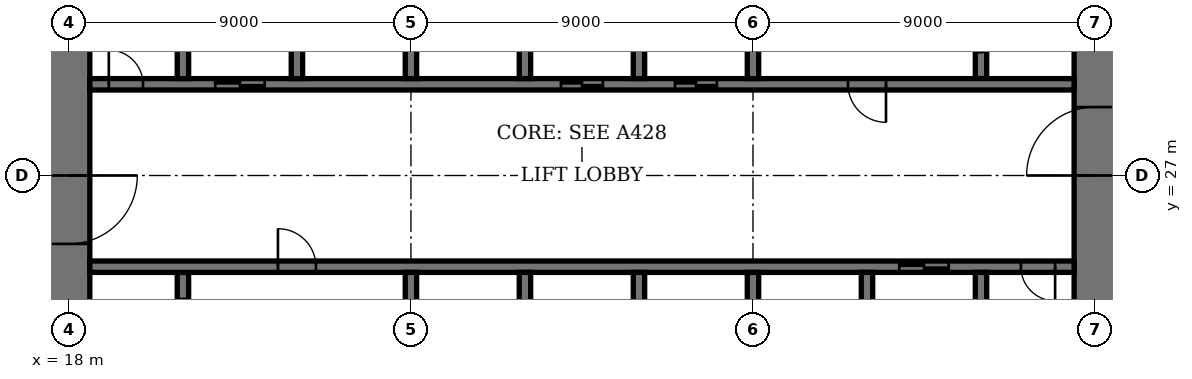
"""IFC4 building model, lengths in metres.
Left out: names, types, materials, properties, quantities, classifications, styles, units other than length and angle.
Written with IfcOpenShell. Run it as: python <this file> out.ifc"""

import sys

from ifc_helpers import new_model, si_unit, direction, frame, frame_2d, origin, place, context, subcontext, project, spatial, rectangle, extrude, element, fill, save


model = new_model("IFC4")
c1 = context("Model", 3, precision=1e-05, world=origin(), true_north=direction((0.0, 1.0)))
c2 = subcontext(c1, "Body", "Model", "MODEL_VIEW")
j1 = project(units=[si_unit("LENGTHUNIT", "METRE"), si_unit("PLANEANGLEUNIT", "RADIAN")], contexts=[c1])
p1 = place(None, origin())
s1 = spatial("IfcSite", under=j1, at=p1, CompositionType="ELEMENT")
p2 = place(p1, origin())
s2 = spatial("IfcBuilding", under=s1, at=p2, CompositionType="ELEMENT")
p3 = place(p2, frame((0.0, 0.0, 145.0)))
s3 = spatial("IfcBuildingStorey", under=s2, at=p3, CompositionType="ELEMENT", Elevation=145.0)
p4 = place(p3, frame((18.0, 35.45, 0.0), z_axis=(0.0, 0.0, 1.0), x_axis=(0.0, -1.0, 0.0)))
e1 = element("IfcWall", 1, at=p4, inside=s3, PredefinedType="SHEAR", context=c2, shape_type="SweptSolid", body=[
    extrude(rectangle(XDim=16.9, YDim=1.1, at=frame_2d((8.45, 0.0))), origin(), (0.0, 0.0, 1.0), 4.0),
])
p5 = place(p4, frame((8.45, 0.0, 0.0)))
e2 = element("IfcOpeningElement", 2, at=p5, cuts=e1, PredefinedType="OPENING", context=c2, shape_type="SweptSolid", body=[
    extrude(rectangle(XDim=1.8, YDim=2.4, at=frame_2d((0.9, 1.2))), frame((0.0, 0.56, 0.0), z_axis=(0.0, -1.0, 0.0), x_axis=(1.0, 0.0, 0.0)), (0.0, 0.0, 1.0), 1.12),
])
p6 = place(p3, frame((45.0, 18.55, 0.0), z_axis=(0.0, 0.0, 1.0), x_axis=(0.0, 1.0, 0.0)))
e3 = element("IfcWall", 3, at=p6, inside=s3, PredefinedType="SHEAR", context=c2, shape_type="SweptSolid", body=[
    extrude(rectangle(XDim=16.9, YDim=1.1, at=frame_2d((8.45, 0.0))), origin(), (0.0, 0.0, 1.0), 4.0),
])
p7 = place(p6, frame((8.45, 0.0, 0.0)))
e4 = element("IfcOpeningElement", 4, at=p7, cuts=e3, PredefinedType="OPENING", context=c2, shape_type="SweptSolid", body=[
    extrude(rectangle(XDim=1.8, YDim=2.4, at=frame_2d((0.9, 1.2))), frame((0.0, 0.56, 0.0), z_axis=(0.0, -1.0, 0.0), x_axis=(1.0, 0.0, 0.0)), (0.0, 0.0, 1.0), 1.12),
])
p8 = place(p3, frame((21.0, 21.95, 0.0), z_axis=(0.0, 0.0, 1.0), x_axis=(0.0, 1.0, 0.0)))
e5 = element("IfcWall", 5, at=p8, inside=s3, PredefinedType="SHEAR", context=c2, shape_type="SweptSolid", body=[
    extrude(rectangle(XDim=2.5, YDim=0.3, at=frame_2d((1.25, 0.0))), origin(), (0.0, 0.0, 1.0), 4.0),
])
p9 = place(p8, frame((0.7, 0.0, 0.0)))
e6 = element("IfcOpeningElement", 6, at=p9, cuts=e5, PredefinedType="OPENING", context=c2, shape_type="SweptSolid", body=[
    extrude(rectangle(XDim=1.1, YDim=2.4, at=frame_2d((0.55, 1.2))), frame((0.0, 0.16, 0.0), z_axis=(0.0, -1.0, 0.0), x_axis=(1.0, 0.0, 0.0)), (0.0, 0.0, 1.0), 0.32),
])
p10 = place(p3, frame((42.0, 29.55, 0.0), z_axis=(0.0, 0.0, 1.0), x_axis=(0.0, 1.0, 0.0)))
e7 = element("IfcWall", 7, at=p10, inside=s3, PredefinedType="SHEAR", context=c2, shape_type="SweptSolid", body=[
    extrude(rectangle(XDim=2.5, YDim=0.3, at=frame_2d((1.25, 0.0))), origin(), (0.0, 0.0, 1.0), 4.0),
])
p11 = place(p10, frame((0.7, 0.0, 0.0)))
e8 = element("IfcOpeningElement", 8, at=p11, cuts=e7, PredefinedType="OPENING", context=c2, shape_type="SweptSolid", body=[
    extrude(rectangle(XDim=1.1, YDim=2.4, at=frame_2d((0.55, 1.2))), frame((0.0, 0.16, 0.0), z_axis=(0.0, -1.0, 0.0), x_axis=(1.0, 0.0, 0.0)), (0.0, 0.0, 1.0), 0.32),
])
p12 = place(p3, frame((18.55, 24.6, 0.0), z_axis=(0.0, 0.0, 1.0), x_axis=(1.0, 0.0, 0.0)))
e9 = element("IfcWall", 9, at=p12, inside=s3, PredefinedType="SHEAR", context=c2, shape_type="SweptSolid", body=[
    extrude(rectangle(XDim=25.9, YDim=0.3, at=frame_2d((12.95, 0.0))), origin(), (0.0, 0.0, 1.0), 4.0),
])
p13 = place(p12, frame((4.95, 0.0, 0.0)))
e10 = element("IfcOpeningElement", 10, at=p13, cuts=e9, PredefinedType="OPENING", context=c2, shape_type="SweptSolid", body=[
    extrude(rectangle(XDim=1.0, YDim=2.4, at=frame_2d((0.5, 1.2))), frame((0.0, 0.16, 0.0), z_axis=(0.0, -1.0, 0.0), x_axis=(1.0, 0.0, 0.0)), (0.0, 0.0, 1.0), 0.32),
])
p14 = place(p12, frame((24.5, 0.0, 0.0)))
e11 = element("IfcOpeningElement", 11, at=p14, cuts=e9, PredefinedType="OPENING", context=c2, shape_type="SweptSolid", body=[
    extrude(rectangle(XDim=0.9, YDim=2.1, at=frame_2d((0.45, 1.05))), frame((0.0, 0.16, 0.0), z_axis=(0.0, -1.0, 0.0), x_axis=(1.0, 0.0, 0.0)), (0.0, 0.0, 1.0), 0.32),
])
p15 = place(p12, frame((21.3, 0.0, 0.0)))
e12 = element("IfcOpeningElement", 12, at=p15, cuts=e9, PredefinedType="OPENING", context=c2, shape_type="SweptSolid", body=[
    extrude(rectangle(XDim=1.3, YDim=2.4, at=frame_2d((0.65, 1.2))), frame((0.0, 0.16, 0.0), z_axis=(0.0, -1.0, 0.0), x_axis=(1.0, 0.0, 0.0)), (0.0, 0.0, 1.0), 0.32),
])
p16 = place(p3, frame((18.55, 29.4, 0.0), z_axis=(0.0, 0.0, 1.0), x_axis=(1.0, 0.0, 0.0)))
e13 = element("IfcWall", 13, at=p16, inside=s3, PredefinedType="SHEAR", context=c2, shape_type="SweptSolid", body=[
    extrude(rectangle(XDim=25.9, YDim=0.3, at=frame_2d((12.95, 0.0))), origin(), (0.0, 0.0, 1.0), 4.0),
])
p17 = place(p16, frame((19.95, 0.0, 0.0)))
e14 = element("IfcOpeningElement", 14, at=p17, cuts=e13, PredefinedType="OPENING", context=c2, shape_type="SweptSolid", body=[
    extrude(rectangle(XDim=1.0, YDim=2.4, at=frame_2d((0.5, 1.2))), frame((0.0, 0.16, 0.0), z_axis=(0.0, -1.0, 0.0), x_axis=(1.0, 0.0, 0.0)), (0.0, 0.0, 1.0), 0.32),
])
p18 = place(p16, frame((0.5, 0.0, 0.0)))
e15 = element("IfcOpeningElement", 15, at=p18, cuts=e13, PredefinedType="OPENING", context=c2, shape_type="SweptSolid", body=[
    extrude(rectangle(XDim=0.9, YDim=2.1, at=frame_2d((0.45, 1.05))), frame((0.0, 0.16, 0.0), z_axis=(0.0, -1.0, 0.0), x_axis=(1.0, 0.0, 0.0)), (0.0, 0.0, 1.0), 0.32),
])
p19 = place(p16, frame((15.4, 0.0, 0.0)))
e16 = element("IfcOpeningElement", 16, at=p19, cuts=e13, PredefinedType="OPENING", context=c2, shape_type="SweptSolid", body=[
    extrude(rectangle(XDim=1.1, YDim=2.4, at=frame_2d((0.55, 1.2))), frame((0.0, 0.16, 0.0), z_axis=(0.0, -1.0, 0.0), x_axis=(1.0, 0.0, 0.0)), (0.0, 0.0, 1.0), 0.32),
])
p20 = place(p16, frame((12.4, 0.0, 0.0)))
e17 = element("IfcOpeningElement", 17, at=p20, cuts=e13, PredefinedType="OPENING", context=c2, shape_type="SweptSolid", body=[
    extrude(rectangle(XDim=1.1, YDim=2.4, at=frame_2d((0.55, 1.2))), frame((0.0, 0.16, 0.0), z_axis=(0.0, -1.0, 0.0), x_axis=(1.0, 0.0, 0.0)), (0.0, 0.0, 1.0), 0.32),
])
p21 = place(p16, frame((3.3, 0.0, 0.0)))
e18 = element("IfcOpeningElement", 18, at=p21, cuts=e13, PredefinedType="OPENING", context=c2, shape_type="SweptSolid", body=[
    extrude(rectangle(XDim=1.3, YDim=2.4, at=frame_2d((0.65, 1.2))), frame((0.0, 0.16, 0.0), z_axis=(0.0, -1.0, 0.0), x_axis=(1.0, 0.0, 0.0)), (0.0, 0.0, 1.0), 0.32),
])
for number, where, z_axis, x_axis in (
    (19, (30.0, 21.75, 0.0), (0.0, 0.0, 1.0), (0.0, 1.0, 0.0)),
    (20, (33.0, 29.55, 0.0), (0.0, 0.0, 1.0), (0.0, 1.0, 0.0)),
    (21, (33.0, 21.75, 0.0), (0.0, 0.0, 1.0), (0.0, 1.0, 0.0)),
    (22, (30.0, 29.55, 0.0), (0.0, 0.0, 1.0), (0.0, 1.0, 0.0)),
    (23, (36.0, 21.75, 0.0), (0.0, 0.0, 1.0), (0.0, 1.0, 0.0)),
    (24, (27.0, 29.55, 0.0), (0.0, 0.0, 1.0), (0.0, 1.0, 0.0)),
):
    element("IfcWall", number, at=place(p3, frame(where, z_axis=z_axis, x_axis=x_axis)), inside=s3, PredefinedType="SHEAR", context=c2, shape_type="SweptSolid", body=[
        extrude(rectangle(XDim=2.7, YDim=0.3, at=frame_2d((1.35, 0.0))), origin(), (0.0, 0.0, 1.0), 4.0),
    ])
for number, where, z_axis, x_axis in (
    (25, (39.0, 18.55, 0.0), (0.0, 0.0, 1.0), (0.0, 1.0, 0.0)),
    (26, (24.0, 29.55, 0.0), (0.0, 0.0, 1.0), (0.0, 1.0, 0.0)),
):
    element("IfcWall", number, at=place(p3, frame(where, z_axis=z_axis, x_axis=x_axis)), inside=s3, PredefinedType="SHEAR", context=c2, shape_type="SweptSolid", body=[
        extrude(rectangle(XDim=5.9, YDim=0.3, at=frame_2d((2.95, 0.0))), origin(), (0.0, 0.0, 1.0), 4.0),
    ])
for number, where, z_axis, x_axis in (
    (27, (42.0, 21.75, 0.0), (0.0, 0.0, 1.0), (0.0, 1.0, 0.0)),
    (28, (21.0, 29.55, 0.0), (0.0, 0.0, 1.0), (0.0, 1.0, 0.0)),
):
    element("IfcWall", number, at=place(p3, frame(where, z_axis=z_axis, x_axis=x_axis)), inside=s3, PredefinedType="SHEAR", context=c2, shape_type="SweptSolid", body=[
        extrude(rectangle(XDim=2.7, YDim=0.3, at=frame_2d((1.35, 0.0))), origin(), (0.0, 0.0, 1.0), 4.0),
    ])
for number, where, z_axis, x_axis in (
    (29, (27.0, 21.6, 0.0), (0.0, 0.0, 1.0), (0.0, 1.0, 0.0)),
    (30, (36.0, 29.55, 0.0), (0.0, 0.0, 1.0), (0.0, 1.0, 0.0)),
):
    element("IfcWall", number, at=place(p3, frame(where, z_axis=z_axis, x_axis=x_axis)), inside=s3, PredefinedType="SHEAR", context=c2, shape_type="SweptSolid", body=[
        extrude(rectangle(XDim=2.85, YDim=0.3, at=frame_2d((1.425, 0.0))), origin(), (0.0, 0.0, 1.0), 4.0),
    ])
p22 = place(p5, origin())
e31 = element("IfcDoor", 31, at=p22, inside=s3, OperationType="DOUBLE_DOOR_DOUBLE_SWING", PredefinedType="DOOR", context=c2, shape_type="SweptSolid", body=[
    extrude(rectangle(XDim=1.8, YDim=2.4, at=frame_2d((0.9, 1.2))), frame((0.0, 0.03, 0.0), z_axis=(0.0, -1.0, 0.0), x_axis=(1.0, 0.0, 0.0)), (0.0, 0.0, 1.0), 0.06),
    extrude(rectangle(XDim=0.04, YDim=2.4, at=frame_2d((0.02, 1.2))), frame((0.0, 0.55, 0.0), z_axis=(0.0, -1.0, 0.0), x_axis=(1.0, 0.0, 0.0)), (0.0, 0.0, 1.0), 1.1),
    extrude(rectangle(XDim=0.04, YDim=2.4, at=frame_2d((1.78, 1.2))), frame((0.0, 0.55, 0.0), z_axis=(0.0, -1.0, 0.0), x_axis=(1.0, 0.0, 0.0)), (0.0, 0.0, 1.0), 1.1),
    extrude(rectangle(XDim=1.8, YDim=0.04, at=frame_2d((0.9, 2.38))), frame((0.0, 0.55, 0.0), z_axis=(0.0, -1.0, 0.0), x_axis=(1.0, 0.0, 0.0)), (0.0, 0.0, 1.0), 1.1),
])
fill(e2, e31)
p23 = place(p7, origin())
e32 = element("IfcDoor", 32, at=p23, inside=s3, OperationType="DOUBLE_DOOR_DOUBLE_SWING", PredefinedType="DOOR", context=c2, shape_type="SweptSolid", body=[
    extrude(rectangle(XDim=1.8, YDim=2.4, at=frame_2d((0.9, 1.2))), frame((0.0, 0.03, 0.0), z_axis=(0.0, -1.0, 0.0), x_axis=(1.0, 0.0, 0.0)), (0.0, 0.0, 1.0), 0.06),
    extrude(rectangle(XDim=0.04, YDim=2.4, at=frame_2d((0.02, 1.2))), frame((0.0, 0.55, 0.0), z_axis=(0.0, -1.0, 0.0), x_axis=(1.0, 0.0, 0.0)), (0.0, 0.0, 1.0), 1.1),
    extrude(rectangle(XDim=0.04, YDim=2.4, at=frame_2d((1.78, 1.2))), frame((0.0, 0.55, 0.0), z_axis=(0.0, -1.0, 0.0), x_axis=(1.0, 0.0, 0.0)), (0.0, 0.0, 1.0), 1.1),
    extrude(rectangle(XDim=1.8, YDim=0.04, at=frame_2d((0.9, 2.38))), frame((0.0, 0.55, 0.0), z_axis=(0.0, -1.0, 0.0), x_axis=(1.0, 0.0, 0.0)), (0.0, 0.0, 1.0), 1.1),
])
fill(e4, e32)
p24 = place(p13, origin())
e33 = element("IfcDoor", 33, at=p24, inside=s3, OperationType="SINGLE_SWING_RIGHT", PredefinedType="DOOR", context=c2, shape_type="SweptSolid", body=[
    extrude(rectangle(XDim=1.0, YDim=2.4, at=frame_2d((0.5, 1.2))), frame((0.0, 0.03, 0.0), z_axis=(0.0, -1.0, 0.0), x_axis=(1.0, 0.0, 0.0)), (0.0, 0.0, 1.0), 0.06),
])
fill(e10, e33)
p25 = place(p17, origin())
e34 = element("IfcDoor", 34, at=p25, inside=s3, OperationType="SINGLE_SWING_RIGHT", PredefinedType="DOOR", context=c2, shape_type="SweptSolid", body=[
    extrude(rectangle(XDim=1.0, YDim=2.4, at=frame_2d((0.5, 1.2))), frame((0.0, 0.03, 0.0), z_axis=(0.0, -1.0, 0.0), x_axis=(1.0, 0.0, 0.0)), (0.0, 0.0, 1.0), 0.06),
])
fill(e14, e34)
p26 = place(p14, origin())
e35 = element("IfcDoor", 35, at=p26, inside=s3, OperationType="SINGLE_SWING_RIGHT", PredefinedType="DOOR", context=c2, shape_type="SweptSolid", body=[
    extrude(rectangle(XDim=0.9, YDim=2.1, at=frame_2d((0.45, 1.05))), frame((0.0, 0.03, 0.0), z_axis=(0.0, -1.0, 0.0), x_axis=(1.0, 0.0, 0.0)), (0.0, 0.0, 1.0), 0.06),
])
fill(e11, e35)
p27 = place(p18, origin())
e36 = element("IfcDoor", 36, at=p27, inside=s3, OperationType="SINGLE_SWING_RIGHT", PredefinedType="DOOR", context=c2, shape_type="SweptSolid", body=[
    extrude(rectangle(XDim=0.9, YDim=2.1, at=frame_2d((0.45, 1.05))), frame((0.0, 0.03, 0.0), z_axis=(0.0, -1.0, 0.0), x_axis=(1.0, 0.0, 0.0)), (0.0, 0.0, 1.0), 0.06),
])
fill(e15, e36)
p28 = place(p19, origin())
e37 = element("IfcDoor", 37, at=p28, inside=s3, OperationType="DOUBLE_DOOR_SLIDING", PredefinedType="DOOR", context=c2, shape_type="SweptSolid", body=[
    extrude(rectangle(XDim=1.1, YDim=2.4, at=frame_2d((0.55, 1.2))), frame((0.0, 0.02, 0.0), z_axis=(0.0, -1.0, 0.0), x_axis=(1.0, 0.0, 0.0)), (0.0, 0.0, 1.0), 0.04),
])
fill(e16, e37)
p29 = place(p20, origin())
e38 = element("IfcDoor", 38, at=p29, inside=s3, OperationType="DOUBLE_DOOR_SLIDING", PredefinedType="DOOR", context=c2, shape_type="SweptSolid", body=[
    extrude(rectangle(XDim=1.1, YDim=2.4, at=frame_2d((0.55, 1.2))), frame((0.0, 0.02, 0.0), z_axis=(0.0, -1.0, 0.0), x_axis=(1.0, 0.0, 0.0)), (0.0, 0.0, 1.0), 0.04),
])
fill(e17, e38)
p30 = place(p15, origin())
e39 = element("IfcDoor", 39, at=p30, inside=s3, OperationType="DOUBLE_DOOR_SLIDING", PredefinedType="DOOR", context=c2, shape_type="SweptSolid", body=[
    extrude(rectangle(XDim=1.3, YDim=2.4, at=frame_2d((0.65, 1.2))), frame((0.0, 0.02, 0.0), z_axis=(0.0, -1.0, 0.0), x_axis=(1.0, 0.0, 0.0)), (0.0, 0.0, 1.0), 0.04),
])
fill(e12, e39)
p31 = place(p21, origin())
e40 = element("IfcDoor", 40, at=p31, inside=s3, OperationType="DOUBLE_DOOR_SLIDING", PredefinedType="DOOR", context=c2, shape_type="SweptSolid", body=[
    extrude(rectangle(XDim=1.3, YDim=2.4, at=frame_2d((0.65, 1.2))), frame((0.0, 0.02, 0.0), z_axis=(0.0, -1.0, 0.0), x_axis=(1.0, 0.0, 0.0)), (0.0, 0.0, 1.0), 0.04),
])
fill(e18, e40)
save(model, sys.argv[1])
